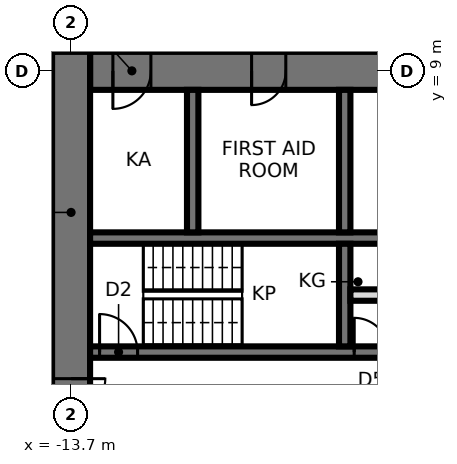
"""IFC4 building model, lengths in metres.
Left out: names, types, materials, properties, quantities, classifications, styles, units other than length and angle.
Written with IfcOpenShell. Run it as: python <this file> out.ifc"""

import sys

from ifc_helpers import new_model, si_unit, direction, frame, frame_2d, origin, place, context, subcontext, project, spatial, rectangle, extrude, element, fill, save


model = new_model("IFC4")
c1 = context("Model", 3, precision=1e-05, world=origin(), true_north=direction((0.0, 1.0)))
c2 = subcontext(c1, "Body", "Model", "MODEL_VIEW")
j1 = project(units=[si_unit("LENGTHUNIT", "METRE"), si_unit("PLANEANGLEUNIT", "RADIAN")], contexts=[c1])
p1 = place(None, origin())
s1 = spatial("IfcSite", under=j1, at=p1, CompositionType="ELEMENT")
p2 = place(p1, origin())
s2 = spatial("IfcBuilding", under=s1, at=p2, CompositionType="ELEMENT")
p3 = place(p2, frame((0.0, 0.0, 226.7)))
s3 = spatial("IfcBuildingStorey", under=s2, at=p3, CompositionType="ELEMENT", Elevation=226.7)
p4 = place(p3, frame((13.2, 9.0, 0.0), z_axis=(0.0, 0.0, 1.0), x_axis=(-1.0, 0.0, 0.0)))
e1 = element("IfcWall", 1, at=p4, inside=s3, PredefinedType="SHEAR", context=c2, shape_type="SweptSolid", body=[
    extrude(rectangle(XDim=26.4, YDim=1.0, at=frame_2d((13.2, 0.0))), origin(), (0.0, 0.0, 1.0), 3.9),
])
p5 = place(p4, frame((2.65, 0.0, 0.0)))
e2 = element("IfcOpeningElement", 2, at=p5, cuts=e1, PredefinedType="OPENING", context=c2, shape_type="SweptSolid", body=[
    extrude(rectangle(XDim=0.9, YDim=2.1, at=frame_2d((0.45, 1.05))), frame((0.0, 0.51, 0.0), z_axis=(0.0, -1.0, 0.0), x_axis=(1.0, 0.0, 0.0)), (0.0, 0.0, 1.0), 1.02),
])
p6 = place(p4, frame((9.5, 0.0, 0.0)))
e3 = element("IfcOpeningElement", 3, at=p6, cuts=e1, PredefinedType="OPENING", context=c2, shape_type="SweptSolid", body=[
    extrude(rectangle(XDim=0.9, YDim=2.1, at=frame_2d((0.45, 1.05))), frame((0.0, 0.51, 0.0), z_axis=(0.0, -1.0, 0.0), x_axis=(1.0, 0.0, 0.0)), (0.0, 0.0, 1.0), 1.02),
])
p7 = place(p4, frame((16.0, 0.0, 0.0)))
e4 = element("IfcOpeningElement", 4, at=p7, cuts=e1, PredefinedType="OPENING", context=c2, shape_type="SweptSolid", body=[
    extrude(rectangle(XDim=0.9, YDim=2.1, at=frame_2d((0.45, 1.05))), frame((0.0, 0.51, 0.0), z_axis=(0.0, -1.0, 0.0), x_axis=(1.0, 0.0, 0.0)), (0.0, 0.0, 1.0), 1.02),
])
p8 = place(p4, frame((21.25, 0.0, 0.0)))
e5 = element("IfcOpeningElement", 5, at=p8, cuts=e1, PredefinedType="OPENING", context=c2, shape_type="SweptSolid", body=[
    extrude(rectangle(XDim=0.9, YDim=2.1, at=frame_2d((0.45, 1.05))), frame((0.0, 0.51, 0.0), z_axis=(0.0, -1.0, 0.0), x_axis=(1.0, 0.0, 0.0)), (0.0, 0.0, 1.0), 1.02),
])
p9 = place(p4, frame((24.8, 0.0, 0.0)))
e6 = element("IfcOpeningElement", 6, at=p9, cuts=e1, PredefinedType="OPENING", context=c2, shape_type="SweptSolid", body=[
    extrude(rectangle(XDim=1.0, YDim=2.1, at=frame_2d((0.5, 1.05))), frame((0.0, 0.51, 0.0), z_axis=(0.0, -1.0, 0.0), x_axis=(1.0, 0.0, 0.0)), (0.0, 0.0, 1.0), 1.02),
])
p10 = place(p3, frame((-13.7, 9.5, 0.0), z_axis=(0.0, 0.0, 1.0), x_axis=(0.0, -1.0, 0.0)))
e7 = element("IfcWall", 7, at=p10, inside=s3, PredefinedType="SHEAR", context=c2, shape_type="SweptSolid", body=[
    extrude(rectangle(XDim=19.0, YDim=1.0, at=frame_2d((9.5, 0.0))), origin(), (0.0, 0.0, 1.0), 3.9),
])
p11 = place(p10, frame((8.6, 0.0, 0.0)))
e8 = element("IfcOpeningElement", 8, at=p11, cuts=e7, PredefinedType="OPENING", context=c2, shape_type="SweptSolid", body=[
    extrude(rectangle(XDim=1.8, YDim=2.4, at=frame_2d((0.9, 1.2))), frame((0.0, 0.51, 0.0), z_axis=(0.0, -1.0, 0.0), x_axis=(1.0, 0.0, 0.0)), (0.0, 0.0, 1.0), 1.02),
])
p12 = place(p3, frame((-13.2, 1.6, 0.0), z_axis=(0.0, 0.0, 1.0), x_axis=(1.0, 0.0, 0.0)))
e9 = element("IfcWall", 9, at=p12, inside=s3, PredefinedType="SHEAR", context=c2, shape_type="SweptSolid", body=[
    extrude(rectangle(XDim=26.4, YDim=0.3, at=frame_2d((13.2, 0.0))), origin(), (0.0, 0.0, 1.0), 3.9),
])
p13 = place(p12, frame((0.25, 0.0, 0.0)))
e10 = element("IfcOpeningElement", 10, at=p13, cuts=e9, PredefinedType="OPENING", context=c2, shape_type="SweptSolid", body=[
    extrude(rectangle(XDim=1.0, YDim=2.1, at=frame_2d((0.5, 1.05))), frame((0.0, 0.16, 0.0), z_axis=(0.0, -1.0, 0.0), x_axis=(1.0, 0.0, 0.0)), (0.0, 0.0, 1.0), 0.32),
])
p14 = place(p12, frame((23.05, 0.0, 0.0)))
e11 = element("IfcOpeningElement", 11, at=p14, cuts=e9, PredefinedType="OPENING", context=c2, shape_type="SweptSolid", body=[
    extrude(rectangle(XDim=1.1, YDim=2.3, at=frame_2d((0.55, 1.15))), frame((0.0, 0.16, 0.0), z_axis=(0.0, -1.0, 0.0), x_axis=(1.0, 0.0, 0.0)), (0.0, 0.0, 1.0), 0.32),
])
p15 = place(p12, frame((20.25, 0.0, 0.0)))
e12 = element("IfcOpeningElement", 12, at=p15, cuts=e9, PredefinedType="OPENING", context=c2, shape_type="SweptSolid", body=[
    extrude(rectangle(XDim=1.5, YDim=2.4, at=frame_2d((0.75, 1.2))), frame((0.0, 0.16, 0.0), z_axis=(0.0, -1.0, 0.0), x_axis=(1.0, 0.0, 0.0)), (0.0, 0.0, 1.0), 0.32),
])
p16 = place(p12, frame((6.95, 0.0, 0.0)))
e13 = element("IfcOpeningElement", 13, at=p16, cuts=e9, PredefinedType="OPENING", context=c2, shape_type="SweptSolid", body=[
    extrude(rectangle(XDim=0.9, YDim=2.1, at=frame_2d((0.45, 1.05))), frame((0.0, 0.16, 0.0), z_axis=(0.0, -1.0, 0.0), x_axis=(1.0, 0.0, 0.0)), (0.0, 0.0, 1.0), 0.32),
])
p17 = place(p12, frame((9.55, 0.0, 0.0)))
e14 = element("IfcOpeningElement", 14, at=p17, cuts=e9, PredefinedType="OPENING", context=c2, shape_type="SweptSolid", body=[
    extrude(rectangle(XDim=0.9, YDim=2.1, at=frame_2d((0.45, 1.05))), frame((0.0, 0.16, 0.0), z_axis=(0.0, -1.0, 0.0), x_axis=(1.0, 0.0, 0.0)), (0.0, 0.0, 1.0), 0.32),
])
p18 = place(p12, frame((12.15, 0.0, 0.0)))
e15 = element("IfcOpeningElement", 15, at=p18, cuts=e9, PredefinedType="OPENING", context=c2, shape_type="SweptSolid", body=[
    extrude(rectangle(XDim=0.9, YDim=2.1, at=frame_2d((0.45, 1.05))), frame((0.0, 0.16, 0.0), z_axis=(0.0, -1.0, 0.0), x_axis=(1.0, 0.0, 0.0)), (0.0, 0.0, 1.0), 0.32),
])
p19 = place(p12, frame((25.45, 0.0, 0.0)))
e16 = element("IfcOpeningElement", 16, at=p19, cuts=e9, PredefinedType="OPENING", context=c2, shape_type="SweptSolid", body=[
    extrude(rectangle(XDim=0.9, YDim=2.1, at=frame_2d((0.45, 1.05))), frame((0.0, 0.16, 0.0), z_axis=(0.0, -1.0, 0.0), x_axis=(1.0, 0.0, 0.0)), (0.0, 0.0, 1.0), 0.32),
])
p20 = place(p3, frame((-13.2, 4.6, 0.0), z_axis=(0.0, 0.0, 1.0), x_axis=(1.0, 0.0, 0.0)))
e17 = element("IfcWall", 17, at=p20, inside=s3, PredefinedType="SHEAR", context=c2, shape_type="SweptSolid", body=[
    extrude(rectangle(XDim=26.4, YDim=0.3, at=frame_2d((13.2, 0.0))), origin(), (0.0, 0.0, 1.0), 3.9),
])
p21 = place(p3, frame((-6.5, 1.75, 0.0), z_axis=(0.0, 0.0, 1.0), x_axis=(0.0, 1.0, 0.0)))
e18 = element("IfcWall", 18, at=p21, inside=s3, PredefinedType="SHEAR", context=c2, shape_type="SweptSolid", body=[
    extrude(rectangle(XDim=2.7, YDim=0.3, at=frame_2d((1.35, 0.0))), origin(), (0.0, 0.0, 1.0), 3.9),
])
for number, where, z_axis, x_axis in (
    (19, (-6.5, 4.75, 0.0), (0.0, 0.0, 1.0), (0.0, 1.0, 0.0)),
    (20, (-10.5, 4.75, 0.0), (0.0, 0.0, 1.0), (0.0, 1.0, 0.0)),
):
    element("IfcWall", number, at=place(p3, frame(where, z_axis=z_axis, x_axis=x_axis)), inside=s3, PredefinedType="SHEAR", context=c2, shape_type="SweptSolid", body=[
        extrude(rectangle(XDim=3.75, YDim=0.3, at=frame_2d((1.875, 0.0))), origin(), (0.0, 0.0, 1.0), 3.9),
    ])
p22 = place(p3, frame((-6.35, 3.1, 0.0), z_axis=(0.0, 0.0, 1.0), x_axis=(1.0, 0.0, 0.0)))
e21 = element("IfcWall", 21, at=p22, inside=s3, PredefinedType="PARTITIONING", context=c2, shape_type="SweptSolid", body=[
    extrude(rectangle(XDim=2.35, YDim=0.3, at=frame_2d((1.175, 0.0))), origin(), (0.0, 0.0, 1.0), 3.74),
])
p23 = place(p22, frame((1.25, 0.0, 0.0)))
e22 = element("IfcOpeningElement", 22, at=p23, cuts=e21, PredefinedType="OPENING", context=c2, shape_type="SweptSolid", body=[
    extrude(rectangle(XDim=1.0, YDim=2.4, at=frame_2d((0.5, 1.2))), frame((0.0, 0.16, 0.0), z_axis=(0.0, -1.0, 0.0), x_axis=(1.0, 0.0, 0.0)), (0.0, 0.0, 1.0), 0.32),
])
p24 = place(p11, origin())
e23 = element("IfcDoor", 23, at=p24, inside=s3, OperationType="DOUBLE_DOOR_SINGLE_SWING", PredefinedType="DOOR", context=c2, shape_type="SweptSolid", body=[
    extrude(rectangle(XDim=1.72, YDim=2.36, at=frame_2d((0.9, 1.18))), frame((0.0, 0.025, 0.0), z_axis=(0.0, -1.0, 0.0), x_axis=(1.0, 0.0, 0.0)), (0.0, 0.0, 1.0), 0.05),
    extrude(rectangle(XDim=0.04, YDim=2.4, at=frame_2d((0.02, 1.2))), frame((0.0, 0.25, 0.0), z_axis=(0.0, -1.0, 0.0), x_axis=(1.0, 0.0, 0.0)), (0.0, 0.0, 1.0), 0.5),
    extrude(rectangle(XDim=0.04, YDim=2.4, at=frame_2d((1.78, 1.2))), frame((0.0, 0.25, 0.0), z_axis=(0.0, -1.0, 0.0), x_axis=(1.0, 0.0, 0.0)), (0.0, 0.0, 1.0), 0.5),
    extrude(rectangle(XDim=1.72, YDim=0.04, at=frame_2d((0.9, 2.38))), frame((0.0, 0.25, 0.0), z_axis=(0.0, -1.0, 0.0), x_axis=(1.0, 0.0, 0.0)), (0.0, 0.0, 1.0), 0.5),
])
fill(e8, e23)
p25 = place(p13, origin())
e24 = element("IfcDoor", 24, at=p25, inside=s3, OperationType="SINGLE_SWING_LEFT", PredefinedType="DOOR", context=c2, shape_type="SweptSolid", body=[
    extrude(rectangle(XDim=1.0, YDim=2.1, at=frame_2d((0.5, 1.05))), frame((0.0, 0.025, 0.0), z_axis=(0.0, -1.0, 0.0), x_axis=(1.0, 0.0, 0.0)), (0.0, 0.0, 1.0), 0.05),
])
fill(e10, e24)
p26 = place(p16, origin())
e25 = element("IfcDoor", 25, at=p26, inside=s3, OperationType="SINGLE_SWING_LEFT", PredefinedType="DOOR", context=c2, shape_type="SweptSolid", body=[
    extrude(rectangle(XDim=0.9, YDim=2.1, at=frame_2d((0.45, 1.05))), frame((0.0, 0.025, 0.0), z_axis=(0.0, -1.0, 0.0), x_axis=(1.0, 0.0, 0.0)), (0.0, 0.0, 1.0), 0.05),
])
fill(e13, e25)
p27 = place(p8, origin())
e26 = element("IfcDoor", 26, at=p27, inside=s3, OperationType="SINGLE_SWING_RIGHT", PredefinedType="DOOR", context=c2, shape_type="SweptSolid", body=[
    extrude(rectangle(XDim=0.82, YDim=2.06, at=frame_2d((0.45, 1.03))), frame((0.0, 0.025, 0.0), z_axis=(0.0, -1.0, 0.0), x_axis=(1.0, 0.0, 0.0)), (0.0, 0.0, 1.0), 0.05),
    extrude(rectangle(XDim=0.04, YDim=2.1, at=frame_2d((0.02, 1.05))), frame((0.0, 0.25, 0.0), z_axis=(0.0, -1.0, 0.0), x_axis=(1.0, 0.0, 0.0)), (0.0, 0.0, 1.0), 0.5),
    extrude(rectangle(XDim=0.04, YDim=2.1, at=frame_2d((0.88, 1.05))), frame((0.0, 0.25, 0.0), z_axis=(0.0, -1.0, 0.0), x_axis=(1.0, 0.0, 0.0)), (0.0, 0.0, 1.0), 0.5),
    extrude(rectangle(XDim=0.82, YDim=0.04, at=frame_2d((0.45, 2.08))), frame((0.0, 0.25, 0.0), z_axis=(0.0, -1.0, 0.0), x_axis=(1.0, 0.0, 0.0)), (0.0, 0.0, 1.0), 0.5),
])
fill(e5, e26)
p28 = place(p9, origin())
e27 = element("IfcDoor", 27, at=p28, inside=s3, OperationType="SINGLE_SWING_RIGHT", PredefinedType="DOOR", context=c2, shape_type="SweptSolid", body=[
    extrude(rectangle(XDim=0.92, YDim=2.06, at=frame_2d((0.5, 1.03))), frame((0.0, 0.025, 0.0), z_axis=(0.0, -1.0, 0.0), x_axis=(1.0, 0.0, 0.0)), (0.0, 0.0, 1.0), 0.05),
    extrude(rectangle(XDim=0.04, YDim=2.1, at=frame_2d((0.02, 1.05))), frame((0.0, 0.25, 0.0), z_axis=(0.0, -1.0, 0.0), x_axis=(1.0, 0.0, 0.0)), (0.0, 0.0, 1.0), 0.5),
    extrude(rectangle(XDim=0.04, YDim=2.1, at=frame_2d((0.98, 1.05))), frame((0.0, 0.25, 0.0), z_axis=(0.0, -1.0, 0.0), x_axis=(1.0, 0.0, 0.0)), (0.0, 0.0, 1.0), 0.5),
    extrude(rectangle(XDim=0.92, YDim=0.04, at=frame_2d((0.5, 2.08))), frame((0.0, 0.25, 0.0), z_axis=(0.0, -1.0, 0.0), x_axis=(1.0, 0.0, 0.0)), (0.0, 0.0, 1.0), 0.5),
])
fill(e6, e27)
save(model, sys.argv[1])
